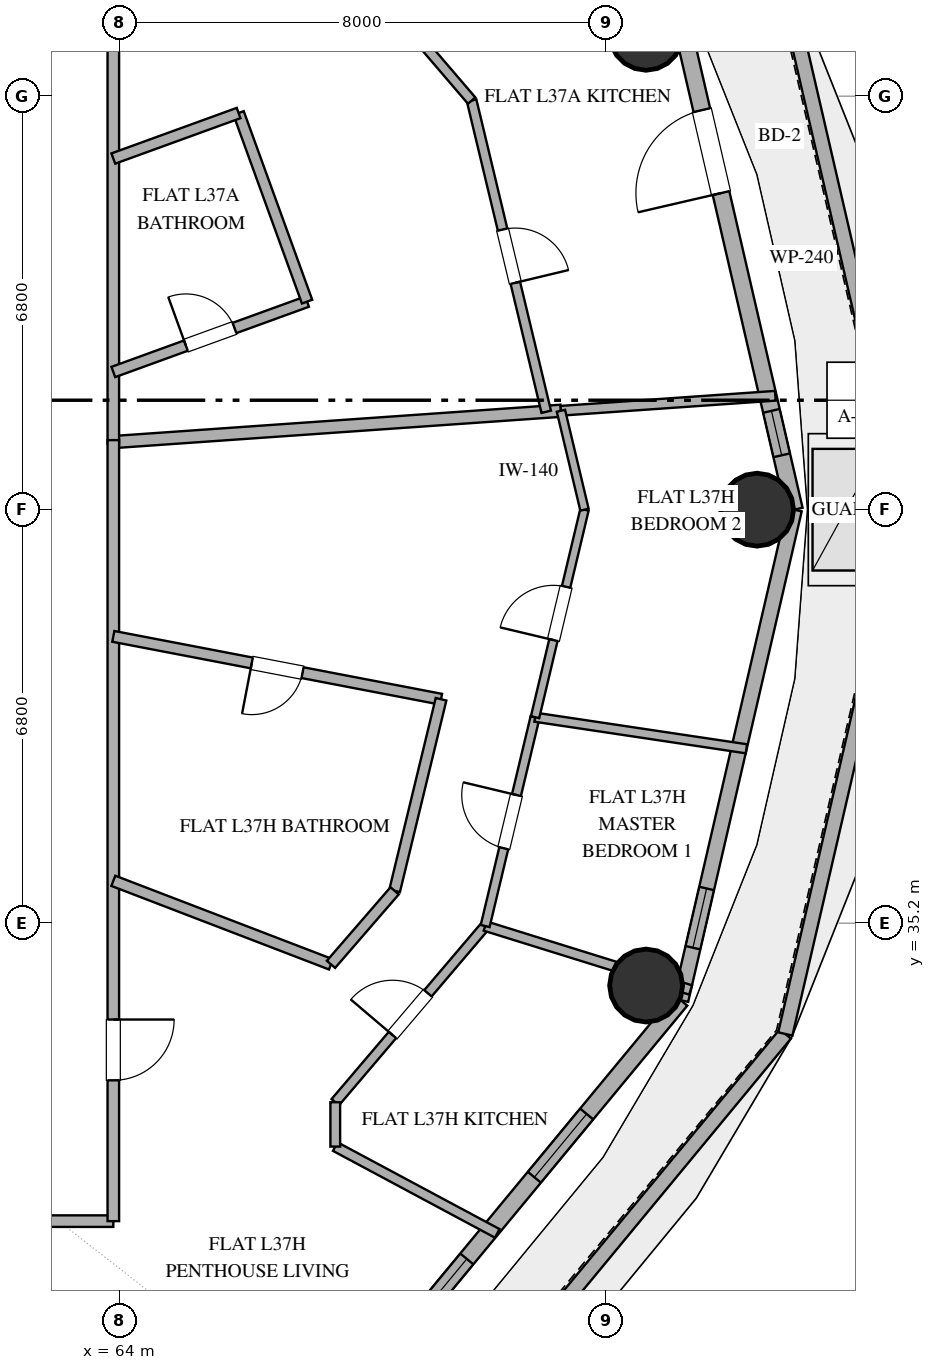
"""IFC4 building model, lengths in metres.
Left out: names, types, materials, properties, quantities, classifications, styles, units other than length and angle.
Written with IfcOpenShell. Run it as: python <this file> out.ifc"""

import sys

from ifc_helpers import new_model, si_unit, direction, frame, frame_2d, origin, origin_2d, place, context, subcontext, project, spatial, rectangle, hollow_circle, extrude, element, fill, save


model = new_model("IFC4")
c1 = context("Model", 3, precision=1e-05, world=origin(), true_north=direction((0.0, 1.0)))
c2 = subcontext(c1, "Body", "Model", "MODEL_VIEW")
j1 = project(units=[si_unit("LENGTHUNIT", "METRE"), si_unit("PLANEANGLEUNIT", "RADIAN")], contexts=[c1])
p1 = place(None, origin())
s1 = spatial("IfcSite", under=j1, at=p1, CompositionType="ELEMENT")
p2 = place(p1, origin())
s2 = spatial("IfcBuilding", under=s1, at=p2, CompositionType="ELEMENT")
p3 = place(p2, frame((0.0, 0.0, 150.6)))
s3 = spatial("IfcBuildingStorey", under=s2, at=p3, CompositionType="ELEMENT", Elevation=150.6)
for number, where, z_axis, x_axis in (
    (1, (74.487, 42.0, 0.0), (0.0, 0.0, 1.0), (1.0, 0.0, 0.0)),
    (2, (72.662, 49.826, 0.0), (0.0, 0.0, 1.0), (1.0, 0.0, 0.0)),
    (3, (72.662, 34.174, 0.0), (0.0, 0.0, 1.0), (1.0, 0.0, 0.0)),
):
    element("IfcColumn", number, at=place(p3, frame(where, z_axis=z_axis, x_axis=x_axis)), inside=s3, PredefinedType="COLUMN", context=c2, shape_type="SweptSolid", body=[
        extrude(hollow_circle(Radius=0.6, WallThickness=0.032, at=origin_2d()), origin(), (0.0, 0.0, 1.0), 3.38),
    ])
p4 = place(p3, frame((76.946, 42.0, 0.0), z_axis=(0.0, 0.0, 1.0), x_axis=(-0.225341034137, 0.974279948646, 0.0)))
e4 = element("IfcWall", 4, at=p4, inside=s3, PredefinedType="PARAPET", context=c2, shape_type="SweptSolid", body=[
    extrude(rectangle(XDim=8.849, YDim=0.24, at=frame_2d((4.425, 0.0))), origin(), (0.0, 0.0, 1.0), 1.25),
])
p5 = place(p3, frame((68.91, 26.069, 0.0), z_axis=(0.0, 0.0, 1.0), x_axis=(0.637107627078, 0.770774851379, 0.0)))
e5 = element("IfcWall", 5, at=p5, inside=s3, PredefinedType="PARAPET", context=c2, shape_type="SweptSolid", body=[
    extrude(rectangle(XDim=9.483, YDim=0.24, at=frame_2d((4.742, 0.0))), origin(), (0.0, 0.0, 1.0), 1.25),
])
p6 = place(p3, frame((74.952, 33.378, 0.0), z_axis=(0.0, 0.0, 1.0), x_axis=(0.225341034137, 0.974279948646, 0.0)))
e6 = element("IfcWall", 6, at=p6, inside=s3, PredefinedType="PARAPET", context=c2, shape_type="SweptSolid", body=[
    extrude(rectangle(XDim=8.849, YDim=0.24, at=frame_2d((4.425, 0.0))), origin(), (0.0, 0.0, 1.0), 1.25),
])
p7 = place(p3, frame((75.099, 42.0, 0.0), z_axis=(0.0, 0.0, 1.0), x_axis=(-0.225473184558, 0.974249374157, 0.0)))
e7 = element("IfcWall", 7, at=p7, inside=s3, PredefinedType="SOLIDWALL", context=c2, shape_type="SweptSolid", body=[
    extrude(rectangle(XDim=8.28, YDim=0.28, at=frame_2d((4.14, 0.0))), origin(), (0.0, 0.0, 1.0), 3.38),
])
p8 = place(p7, frame((5.344, 0.0, 0.0)))
e8 = element("IfcOpeningElement", 8, at=p8, cuts=e7, PredefinedType="OPENING", context=c2, shape_type="SweptSolid", body=[
    extrude(rectangle(XDim=1.4, YDim=2.2, at=frame_2d((0.7, 1.1))), frame((0.0, 0.15, 0.0), z_axis=(0.0, -1.0, 0.0), x_axis=(1.0, 0.0, 0.0)), (0.0, 0.0, 1.0), 0.3),
])
p9 = place(p7, frame((0.918, 0.0, 0.85)))
e9 = element("IfcOpeningElement", 9, at=p9, cuts=e7, PredefinedType="OPENING", context=c2, shape_type="SweptSolid", body=[
    extrude(rectangle(XDim=0.75, YDim=1.8, at=frame_2d((0.375, 0.9))), frame((0.0, 0.15, 0.0), z_axis=(0.0, -1.0, 0.0), x_axis=(1.0, 0.0, 0.0)), (0.0, 0.0, 1.0), 0.3),
])
p10 = place(p3, frame((67.576, 27.094, 0.0), z_axis=(0.0, 0.0, 1.0), x_axis=(0.637333477683, 0.770588111915, 0.0)))
e10 = element("IfcWall", 10, at=p10, inside=s3, PredefinedType="SOLIDWALL", context=c2, shape_type="SweptSolid", body=[
    extrude(rectangle(XDim=8.875, YDim=0.28, at=frame_2d((4.438, 0.0))), origin(), (0.0, 0.0, 1.0), 3.38),
])
p11 = place(p10, frame((1.854, 0.0, 0.85)))
e11 = element("IfcOpeningElement", 11, at=p11, cuts=e10, PredefinedType="OPENING", context=c2, shape_type="SweptSolid", body=[
    extrude(rectangle(XDim=1.5, YDim=1.8, at=frame_2d((0.75, 0.9))), frame((0.0, 0.15, 0.0), z_axis=(0.0, -1.0, 0.0), x_axis=(1.0, 0.0, 0.0)), (0.0, 0.0, 1.0), 0.3),
])
p12 = place(p10, frame((5.097, 0.0, 0.85)))
e12 = element("IfcOpeningElement", 12, at=p12, cuts=e10, PredefinedType="OPENING", context=c2, shape_type="SweptSolid", body=[
    extrude(rectangle(XDim=1.35, YDim=1.8, at=frame_2d((0.675, 0.9))), frame((0.0, 0.15, 0.0), z_axis=(0.0, -1.0, 0.0), x_axis=(1.0, 0.0, 0.0)), (0.0, 0.0, 1.0), 0.3),
])
p13 = place(p3, frame((73.232, 33.933, 0.0), z_axis=(0.0, 0.0, 1.0), x_axis=(0.225473184558, 0.974249374157, 0.0)))
e13 = element("IfcWall", 13, at=p13, inside=s3, PredefinedType="SOLIDWALL", context=c2, shape_type="SweptSolid", body=[
    extrude(rectangle(XDim=8.28, YDim=0.25, at=frame_2d((4.14, 0.0))), origin(), (0.0, 0.0, 1.0), 3.38),
])
p14 = place(p13, frame((0.886, 0.0, 0.35)))
e14 = element("IfcOpeningElement", 14, at=p14, cuts=e13, PredefinedType="OPENING", context=c2, shape_type="SweptSolid", body=[
    extrude(rectangle(XDim=1.0, YDim=1.05, at=frame_2d((0.5, 0.525))), frame((0.0, 0.135, 0.0), z_axis=(0.0, -1.0, 0.0), x_axis=(1.0, 0.0, 0.0)), (0.0, 0.0, 1.0), 0.27),
])
p15 = place(p3, frame((48.891, 30.3, 0.0), z_axis=(0.0, 0.0, 1.0), x_axis=(1.0, 0.0, 0.0)))
e15 = element("IfcWall", 15, at=p15, inside=s3, PredefinedType="PARTITIONING", context=c2, shape_type="SweptSolid", body=[
    extrude(rectangle(XDim=15.009, YDim=0.19, at=frame_2d((7.504, 0.0))), origin(), (0.0, 0.0, 1.0), 2.74),
])
p16 = place(p15, frame((4.704, 0.0, 0.0)))
e16 = element("IfcOpeningElement", 16, at=p16, cuts=e15, PredefinedType="OPENING", context=c2, shape_type="SweptSolid", body=[
    extrude(rectangle(XDim=1.0, YDim=2.2, at=frame_2d((0.5, 1.1))), frame((0.0, 0.105, 0.0), z_axis=(0.0, -1.0, 0.0), x_axis=(1.0, 0.0, 0.0)), (0.0, 0.0, 1.0), 0.21),
])
p17 = place(p3, frame((71.261, 43.627, 0.0), z_axis=(0.0, 0.0, 1.0), x_axis=(-0.997562906323, -0.069772830877, 0.0)))
e17 = element("IfcWall", 17, at=p17, inside=s3, PredefinedType="PARTITIONING", context=c2, shape_type="SweptSolid", body=[
    extrude(rectangle(XDim=7.38, YDim=0.2, at=frame_2d((3.69, 0.0))), origin(), (0.0, 0.0, 1.0), 2.74),
])
p18 = place(p3, frame((63.9, 53.7, 0.0), z_axis=(0.0, 0.0, 1.0), x_axis=(0.0, -1.0, 0.0)))
e18 = element("IfcWall", 18, at=p18, inside=s3, PredefinedType="PARTITIONING", context=c2, shape_type="SweptSolid", body=[
    extrude(rectangle(XDim=10.62, YDim=0.19, at=frame_2d((5.31, 0.0))), origin(), (0.0, 0.0, 1.0), 2.74),
])
p19 = place(p18, frame((2.48, 0.0, 0.0)))
e19 = element("IfcOpeningElement", 19, at=p19, cuts=e18, PredefinedType="OPENING", context=c2, shape_type="SweptSolid", body=[
    extrude(rectangle(XDim=1.0, YDim=2.2, at=frame_2d((0.5, 1.1))), frame((0.0, 0.105, 0.0), z_axis=(0.0, -1.0, 0.0), x_axis=(1.0, 0.0, 0.0)), (0.0, 0.0, 1.0), 0.21),
])
p20 = place(p3, frame((63.9, 43.144, 0.0), z_axis=(0.0, 0.0, 1.0), x_axis=(0.0, -1.0, 0.0)))
e20 = element("IfcWall", 20, at=p20, inside=s3, PredefinedType="PARTITIONING", context=c2, shape_type="SweptSolid", body=[
    extrude(rectangle(XDim=12.844, YDim=0.19, at=frame_2d((6.422, 0.0))), origin(), (0.0, 0.0, 1.0), 2.74),
])
p21 = place(p20, frame((9.529, 0.0, 0.0)))
e21 = element("IfcOpeningElement", 21, at=p21, cuts=e20, PredefinedType="OPENING", context=c2, shape_type="SweptSolid", body=[
    extrude(rectangle(XDim=1.0, YDim=2.2, at=frame_2d((0.5, 1.1))), frame((0.0, 0.105, 0.0), z_axis=(0.0, -1.0, 0.0), x_axis=(1.0, 0.0, 0.0)), (0.0, 0.0, 1.0), 0.21),
])
p22 = place(p3, frame((69.29, 38.883, 0.0), z_axis=(0.0, 0.0, 1.0), x_axis=(-0.98210182834, 0.188350733396, 0.0)))
e22 = element("IfcWall", 22, at=p22, inside=s3, PredefinedType="PLUMBINGWALL", context=c2, shape_type="SweptSolid", body=[
    extrude(rectangle(XDim=5.488, YDim=0.18, at=frame_2d((2.744, 0.0))), origin(), (0.0, 0.0, 1.0), 2.74),
])
p23 = place(p22, frame((2.319, 0.0, 0.0)))
e23 = element("IfcOpeningElement", 23, at=p23, cuts=e22, PredefinedType="OPENING", context=c2, shape_type="SweptSolid", body=[
    extrude(rectangle(XDim=0.85, YDim=2.1, at=frame_2d((0.425, 1.05))), frame((0.0, 0.1, 0.0), z_axis=(0.0, -1.0, 0.0), x_axis=(1.0, 0.0, 0.0)), (0.0, 0.0, 1.0), 0.2),
])
p24 = place(p3, frame((69.793, 48.728, 0.0), z_axis=(0.0, 0.0, 1.0), x_axis=(0.23310450522, -0.972451690135, 0.0)))
e24 = element("IfcWall", 24, at=p24, inside=s3, PredefinedType="PLUMBINGWALL", context=c2, shape_type="SweptSolid", body=[
    extrude(rectangle(XDim=5.263, YDim=0.16, at=frame_2d((2.631, 0.0))), origin(), (0.0, 0.0, 1.0), 2.74),
])
p25 = place(p24, frame((2.181, 0.0, 0.0)))
e25 = element("IfcOpeningElement", 25, at=p25, cuts=e24, PredefinedType="OPENING", context=c2, shape_type="SweptSolid", body=[
    extrude(rectangle(XDim=0.9, YDim=2.1, at=frame_2d((0.45, 1.05))), frame((0.0, 0.09, 0.0), z_axis=(0.0, -1.0, 0.0), x_axis=(1.0, 0.0, 0.0)), (0.0, 0.0, 1.0), 0.18),
])
p26 = place(p3, frame((59.299, 30.3, 0.0), z_axis=(0.0, 0.0, 1.0), x_axis=(0.694647685064, -0.719350118952, 0.0)))
e26 = element("IfcWall", 26, at=p26, inside=s3, PredefinedType="PARTITIONING", context=c2, shape_type="SweptSolid", body=[
    extrude(rectangle(XDim=7.047, YDim=0.2, at=frame_2d((3.523, 0.0))), origin(), (0.0, 0.0, 1.0), 2.74),
])
p27 = place(p3, frame((63.9, 35.896, 0.0), z_axis=(0.0, 0.0, 1.0), x_axis=(0.933598121494, -0.3583218491, 0.0)))
e27 = element("IfcWall", 27, at=p27, inside=s3, PredefinedType="PLUMBINGWALL", context=c2, shape_type="SweptSolid", body=[
    extrude(rectangle(XDim=3.834, YDim=0.18, at=frame_2d((1.917, 0.0))), origin(), (0.0, 0.0, 1.0), 2.74),
])
p28 = place(p3, frame((67.55, 32.256, 0.0), z_axis=(0.0, 0.0, 1.0), x_axis=(0.648060027494, 0.76158925988, 0.0)))
e28 = element("IfcWall", 28, at=p28, inside=s3, PredefinedType="PLUMBINGWALL", context=c2, shape_type="SweptSolid", body=[
    extrude(rectangle(XDim=3.804, YDim=0.16, at=frame_2d((1.902, 0.0))), origin(), (0.0, 0.0, 1.0), 2.74),
])
p29 = place(p28, frame((1.452, 0.0, 0.0)))
e29 = element("IfcOpeningElement", 29, at=p29, cuts=e28, PredefinedType="OPENING", context=c2, shape_type="SweptSolid", body=[
    extrude(rectangle(XDim=0.9, YDim=2.1, at=frame_2d((0.45, 1.05))), frame((0.0, 0.09, 0.0), z_axis=(0.0, -1.0, 0.0), x_axis=(1.0, 0.0, 0.0)), (0.0, 0.0, 1.0), 0.18),
])
p30 = place(p3, frame((70.015, 35.153, 0.0), z_axis=(0.0, 0.0, 1.0), x_axis=(0.954891562425, -0.296954717101, 0.0)))
e30 = element("IfcWall", 30, at=p30, inside=s3, PredefinedType="PLUMBINGWALL", context=c2, shape_type="SweptSolid", body=[
    extrude(rectangle(XDim=3.539, YDim=0.16, at=frame_2d((1.769, 0.0))), origin(), (0.0, 0.0, 1.0), 2.74),
])
p31 = place(p3, frame((71.261, 43.627, 0.0), z_axis=(0.0, 0.0, 1.0), x_axis=(0.997563824095, 0.069759707979, 0.0)))
e31 = element("IfcWall", 31, at=p31, inside=s3, PredefinedType="PLUMBINGWALL", context=c2, shape_type="SweptSolid", body=[
    extrude(rectangle(XDim=3.535, YDim=0.16, at=frame_2d((1.767, 0.0))), origin(), (0.0, 0.0, 1.0), 2.74),
])
p32 = place(p3, frame((70.015, 35.153, 0.0), z_axis=(0.0, 0.0, 1.0), x_axis=(0.232452361323, 0.972607783084, 0.0)))
e32 = element("IfcWall", 32, at=p32, inside=s3, PredefinedType="PARTITIONING", context=c2, shape_type="SweptSolid", body=[
    extrude(rectangle(XDim=3.531, YDim=0.15, at=frame_2d((1.766, 0.0))), origin(), (0.0, 0.0, 1.0), 2.74),
])
p33 = place(p32, frame((1.315, 0.0, 0.0)))
e33 = element("IfcOpeningElement", 33, at=p33, cuts=e32, PredefinedType="OPENING", context=c2, shape_type="SweptSolid", body=[
    extrude(rectangle(XDim=0.9, YDim=2.1, at=frame_2d((0.45, 1.05))), frame((0.0, 0.085, 0.0), z_axis=(0.0, -1.0, 0.0), x_axis=(1.0, 0.0, 0.0)), (0.0, 0.0, 1.0), 0.17),
])
p34 = place(p3, frame((74.312, 38.068, 0.0), z_axis=(0.0, 0.0, 1.0), x_axis=(-0.989013160958, 0.147827492205, 0.0)))
e34 = element("IfcWall", 34, at=p34, inside=s3, PredefinedType="PARTITIONING", context=c2, shape_type="SweptSolid", body=[
    extrude(rectangle(XDim=3.514, YDim=0.15, at=frame_2d((1.757, 0.0))), origin(), (0.0, 0.0, 1.0), 2.74),
])
p35 = place(p3, frame((70.836, 38.587, 0.0), z_axis=(0.0, 0.0, 1.0), x_axis=(0.231598574747, 0.972811441223, 0.0)))
e35 = element("IfcWall", 35, at=p35, inside=s3, PredefinedType="PARTITIONING", context=c2, shape_type="SweptSolid", body=[
    extrude(rectangle(XDim=3.508, YDim=0.14, at=frame_2d((1.754, 0.0))), origin(), (0.0, 0.0, 1.0), 2.74),
])
p36 = place(p35, frame((1.304, 0.0, 0.0)))
e36 = element("IfcOpeningElement", 36, at=p36, cuts=e35, PredefinedType="OPENING", context=c2, shape_type="SweptSolid", body=[
    extrude(rectangle(XDim=0.9, YDim=2.1, at=frame_2d((0.45, 1.05))), frame((0.0, 0.08, 0.0), z_axis=(0.0, -1.0, 0.0), x_axis=(1.0, 0.0, 0.0)), (0.0, 0.0, 1.0), 0.16),
])
p37 = place(p3, frame((63.9, 44.264, 0.0), z_axis=(0.0, 0.0, 1.0), x_axis=(0.939936319397, 0.341349843238, 0.0)))
e37 = element("IfcWall", 37, at=p37, inside=s3, PredefinedType="PLUMBINGWALL", context=c2, shape_type="SweptSolid", body=[
    extrude(rectangle(XDim=3.39, YDim=0.18, at=frame_2d((1.695, 0.0))), origin(), (0.0, 0.0, 1.0), 2.74),
])
p38 = place(p37, frame((1.27, 0.0, 0.0)))
e38 = element("IfcOpeningElement", 38, at=p38, cuts=e37, PredefinedType="OPENING", context=c2, shape_type="SweptSolid", body=[
    extrude(rectangle(XDim=0.85, YDim=2.1, at=frame_2d((0.425, 1.05))), frame((0.0, 0.1, 0.0), z_axis=(0.0, -1.0, 0.0), x_axis=(1.0, 0.0, 0.0)), (0.0, 0.0, 1.0), 0.2),
])
p39 = place(p3, frame((67.086, 45.421, 0.0), z_axis=(0.0, 0.0, 1.0), x_axis=(-0.341333094487, 0.93994240175, 0.0)))
e39 = element("IfcWall", 39, at=p39, inside=s3, PredefinedType="PLUMBINGWALL", context=c2, shape_type="SweptSolid", body=[
    extrude(rectangle(XDim=3.3, YDim=0.18, at=frame_2d((1.65, 0.0))), origin(), (0.0, 0.0, 1.0), 2.74),
])
p40 = place(p3, frame((68.526, 35.732, 0.0), z_axis=(0.0, 0.0, 1.0), x_axis=(0.235531062042, 0.971866821541, 0.0)))
e40 = element("IfcWall", 40, at=p40, inside=s3, PredefinedType="PLUMBINGWALL", context=c2, shape_type="SweptSolid", body=[
    extrude(rectangle(XDim=3.242, YDim=0.18, at=frame_2d((1.621, 0.0))), origin(), (0.0, 0.0, 1.0), 2.74),
])
p41 = place(p3, frame((70.214, 30.099, 0.0), z_axis=(0.0, 0.0, 1.0), x_axis=(-0.881434325569, 0.472306605616, 0.0)))
e41 = element("IfcWall", 41, at=p41, inside=s3, PredefinedType="PLUMBINGWALL", context=c2, shape_type="SweptSolid", body=[
    extrude(rectangle(XDim=3.022, YDim=0.16, at=frame_2d((1.511, 0.0))), origin(), (0.0, 0.0, 1.0), 2.74),
])
p42 = place(p3, frame((65.96, 48.523, 0.0), z_axis=(0.0, 0.0, 1.0), x_axis=(-0.939962415694, -0.341277976263, 0.0)))
e42 = element("IfcWall", 42, at=p42, inside=s3, PredefinedType="PLUMBINGWALL", context=c2, shape_type="SweptSolid", body=[
    extrude(rectangle(XDim=2.192, YDim=0.18, at=frame_2d((1.096, 0.0))), origin(), (0.0, 0.0, 1.0), 2.74),
])
p43 = place(p3, frame((71.649, 42.0, 0.0), z_axis=(0.0, 0.0, 1.0), x_axis=(-0.231561310927, 0.972820311919, 0.0)))
e43 = element("IfcWall", 43, at=p43, inside=s3, PredefinedType="PARTITIONING", context=c2, shape_type="SweptSolid", body=[
    extrude(rectangle(XDim=1.672, YDim=0.14, at=frame_2d((0.836, 0.0))), origin(), (0.0, 0.0, 1.0), 2.74),
])
p44 = place(p3, frame((67.479, 34.523, 0.0), z_axis=(0.0, 0.0, 1.0), x_axis=(0.654605010187, 0.755971084525, 0.0)))
e44 = element("IfcWall", 44, at=p44, inside=s3, PredefinedType="PLUMBINGWALL", context=c2, shape_type="SweptSolid", body=[
    extrude(rectangle(XDim=1.599, YDim=0.18, at=frame_2d((0.8, 0.0))), origin(), (0.0, 0.0, 1.0), 2.74),
])
p45 = place(p3, frame((69.018, 49.633, 0.0), z_axis=(0.0, 0.0, 1.0), x_axis=(0.650538392346, -0.759473370227, 0.0)))
e45 = element("IfcWall", 45, at=p45, inside=s3, PredefinedType="PLUMBINGWALL", context=c2, shape_type="SweptSolid", body=[
    extrude(rectangle(XDim=1.192, YDim=0.16, at=frame_2d((0.596, 0.0))), origin(), (0.0, 0.0, 1.0), 2.74),
])
p46 = place(p3, frame((67.55, 31.526, 0.0), z_axis=(0.0, 0.0, 1.0), x_axis=(0.0, 1.0, 0.0)))
e46 = element("IfcWall", 46, at=p46, inside=s3, PredefinedType="PLUMBINGWALL", context=c2, shape_type="SweptSolid", body=[
    extrude(rectangle(XDim=0.73, YDim=0.16, at=frame_2d((0.365, 0.0))), origin(), (0.0, 0.0, 1.0), 2.74),
])
p47 = place(p3, origin())
p48 = place(p47, frame((75.95, 42.0, 0.0)))
p49 = place(p48, frame((0.0, 0.0, 0.11)))
e47 = element("IfcDoor", 47, at=p49, inside=s3, OperationType="SINGLE_SWING_LEFT", PredefinedType="TRAPDOOR", context=c2, shape_type="SweptSolid", body=[
    extrude(rectangle(XDim=1.1, YDim=2.0, at=origin_2d()), origin(), (0.0, 0.0, 1.0), 0.05),
])
p50 = place(p8, origin())
e48 = element("IfcDoor", 48, at=p50, inside=s3, OperationType="SINGLE_SWING_LEFT", PredefinedType="DOOR", context=c2, shape_type="SweptSolid", body=[
    extrude(rectangle(XDim=1.4, YDim=2.2, at=frame_2d((0.7, 1.1))), frame((0.0, 0.025, 0.0), z_axis=(0.0, -1.0, 0.0), x_axis=(1.0, 0.0, 0.0)), (0.0, 0.0, 1.0), 0.05),
])
fill(e8, e48)
p51 = place(p11, origin())
e49 = element("IfcWindow", 49, at=p51, inside=s3, PartitioningType="SINGLE_PANEL", PredefinedType="WINDOW", context=c2, shape_type="SweptSolid", body=[
    extrude(rectangle(XDim=1.5, YDim=1.8, at=frame_2d((0.75, 0.9))), frame((0.0, 0.03, 0.0), z_axis=(0.0, -1.0, 0.0), x_axis=(1.0, 0.0, 0.0)), (0.0, 0.0, 1.0), 0.06),
])
fill(e11, e49)
p52 = place(p12, origin())
e50 = element("IfcWindow", 50, at=p52, inside=s3, PartitioningType="SINGLE_PANEL", PredefinedType="WINDOW", context=c2, shape_type="SweptSolid", body=[
    extrude(rectangle(XDim=1.35, YDim=1.8, at=frame_2d((0.675, 0.9))), frame((0.0, 0.03, 0.0), z_axis=(0.0, -1.0, 0.0), x_axis=(1.0, 0.0, 0.0)), (0.0, 0.0, 1.0), 0.06),
])
fill(e12, e50)
p53 = place(p14, origin())
e51 = element("IfcWindow", 51, at=p53, inside=s3, PartitioningType="SINGLE_PANEL", PredefinedType="WINDOW", context=c2, shape_type="SweptSolid", body=[
    extrude(rectangle(XDim=1.0, YDim=1.05, at=frame_2d((0.5, 0.525))), frame((0.0, 0.03, 0.0), z_axis=(0.0, -1.0, 0.0), x_axis=(1.0, 0.0, 0.0)), (0.0, 0.0, 1.0), 0.06),
])
fill(e14, e51)
p54 = place(p9, origin())
e52 = element("IfcWindow", 52, at=p54, inside=s3, PartitioningType="SINGLE_PANEL", PredefinedType="WINDOW", context=c2, shape_type="SweptSolid", body=[
    extrude(rectangle(XDim=0.75, YDim=1.8, at=frame_2d((0.375, 0.9))), frame((0.0, 0.03, 0.0), z_axis=(0.0, -1.0, 0.0), x_axis=(1.0, 0.0, 0.0)), (0.0, 0.0, 1.0), 0.06),
])
fill(e9, e52)
p55 = place(p21, origin())
e53 = element("IfcDoor", 53, at=p55, inside=s3, OperationType="SINGLE_SWING_LEFT", PredefinedType="DOOR", context=c2, shape_type="SweptSolid", body=[
    extrude(rectangle(XDim=1.0, YDim=2.2, at=frame_2d((0.5, 1.1))), frame((0.0, 0.025, 0.0), z_axis=(0.0, -1.0, 0.0), x_axis=(1.0, 0.0, 0.0)), (0.0, 0.0, 1.0), 0.05),
])
fill(e21, e53)
p56 = place(p23, origin())
e54 = element("IfcDoor", 54, at=p56, inside=s3, OperationType="SINGLE_SWING_RIGHT", PredefinedType="DOOR", context=c2, shape_type="SweptSolid", body=[
    extrude(rectangle(XDim=0.85, YDim=2.1, at=frame_2d((0.425, 1.05))), frame((0.0, 0.025, 0.0), z_axis=(0.0, -1.0, 0.0), x_axis=(1.0, 0.0, 0.0)), (0.0, 0.0, 1.0), 0.05),
])
fill(e23, e54)
p57 = place(p25, origin())
e55 = element("IfcDoor", 55, at=p57, inside=s3, OperationType="SINGLE_SWING_RIGHT", PredefinedType="DOOR", context=c2, shape_type="SweptSolid", body=[
    extrude(rectangle(XDim=0.9, YDim=2.1, at=frame_2d((0.45, 1.05))), frame((0.0, 0.025, 0.0), z_axis=(0.0, -1.0, 0.0), x_axis=(1.0, 0.0, 0.0)), (0.0, 0.0, 1.0), 0.05),
])
fill(e25, e55)
p58 = place(p29, origin())
e56 = element("IfcDoor", 56, at=p58, inside=s3, OperationType="SINGLE_SWING_LEFT", PredefinedType="DOOR", context=c2, shape_type="SweptSolid", body=[
    extrude(rectangle(XDim=0.9, YDim=2.1, at=frame_2d((0.45, 1.05))), frame((0.0, 0.025, 0.0), z_axis=(0.0, -1.0, 0.0), x_axis=(1.0, 0.0, 0.0)), (0.0, 0.0, 1.0), 0.05),
])
fill(e29, e56)
p59 = place(p33, origin())
e57 = element("IfcDoor", 57, at=p59, inside=s3, OperationType="SINGLE_SWING_RIGHT", PredefinedType="DOOR", context=c2, shape_type="SweptSolid", body=[
    extrude(rectangle(XDim=0.9, YDim=2.1, at=frame_2d((0.45, 1.05))), frame((0.0, 0.025, 0.0), z_axis=(0.0, -1.0, 0.0), x_axis=(1.0, 0.0, 0.0)), (0.0, 0.0, 1.0), 0.05),
])
fill(e33, e57)
p60 = place(p36, origin())
e58 = element("IfcDoor", 58, at=p60, inside=s3, OperationType="SINGLE_SWING_LEFT", PredefinedType="DOOR", context=c2, shape_type="SweptSolid", body=[
    extrude(rectangle(XDim=0.9, YDim=2.1, at=frame_2d((0.45, 1.05))), frame((0.0, 0.025, 0.0), z_axis=(0.0, -1.0, 0.0), x_axis=(1.0, 0.0, 0.0)), (0.0, 0.0, 1.0), 0.05),
])
fill(e36, e58)
p61 = place(p38, origin())
e59 = element("IfcDoor", 59, at=p61, inside=s3, OperationType="SINGLE_SWING_LEFT", PredefinedType="DOOR", context=c2, shape_type="SweptSolid", body=[
    extrude(rectangle(XDim=0.85, YDim=2.1, at=frame_2d((0.425, 1.05))), frame((0.0, 0.025, 0.0), z_axis=(0.0, -1.0, 0.0), x_axis=(1.0, 0.0, 0.0)), (0.0, 0.0, 1.0), 0.05),
])
fill(e38, e59)
save(model, sys.argv[1])
